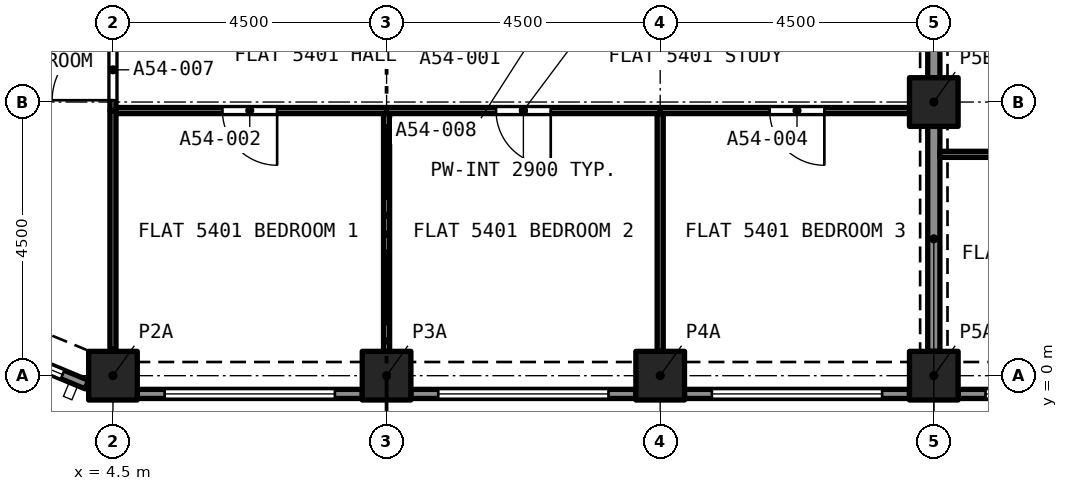
"""IFC4 building model, lengths in metres.
Left out: names, types, materials, properties, quantities, classifications, styles, units other than length and angle.
Written with IfcOpenShell. Run it as: python <this file> out.ifc"""

import sys

from ifc_helpers import new_model, si_unit, direction, frame, frame_2d, origin, origin_2d, place, context, subcontext, project, spatial, rectangle, extrude, element, fill, save


model = new_model("IFC4")
c1 = context("Model", 3, precision=1e-05, world=origin(), true_north=direction((0.0, 1.0)))
c2 = subcontext(c1, "Body", "Model", "MODEL_VIEW")
j1 = project(units=[si_unit("LENGTHUNIT", "METRE"), si_unit("PLANEANGLEUNIT", "RADIAN")], contexts=[c1])
p1 = place(None, origin())
s1 = spatial("IfcSite", under=j1, at=p1, CompositionType="ELEMENT")
p2 = place(p1, origin())
s2 = spatial("IfcBuilding", under=s1, at=p2, CompositionType="ELEMENT")
p3 = place(p2, frame((0.0, 0.0, 195.5)))
s3 = spatial("IfcBuildingStorey", under=s2, at=p3, CompositionType="ELEMENT", Elevation=195.5)
for number, where, z_axis, x_axis in (
    (1, (4.5, 0.0, 0.0), (0.0, 0.0, 1.0), (1.0, 0.0, 0.0)),
    (2, (9.0, 0.0, 0.0), (0.0, 0.0, 1.0), (1.0, 0.0, 0.0)),
    (3, (13.5, 0.0, 0.0), (0.0, 0.0, 1.0), (1.0, 0.0, 0.0)),
    (4, (18.0, 0.0, 0.0), (0.0, 0.0, 1.0), (1.0, 0.0, 0.0)),
    (5, (18.0, 4.5, 0.0), (0.0, 0.0, 1.0), (1.0, 0.0, 0.0)),
):
    element("IfcColumn", number, at=place(p3, frame(where, z_axis=z_axis, x_axis=x_axis)), inside=s3, PredefinedType="COLUMN", context=c2, shape_type="SweptSolid", body=[
        extrude(rectangle(XDim=0.8, YDim=0.8, at=origin_2d()), origin(), (0.0, 0.0, 1.0), 3.2),
    ])
p4 = place(p3, frame((4.071, -0.147, 0.0), z_axis=(0.0, 0.0, 1.0), x_axis=(-0.923885342263, 0.382669406082, 0.0)))
e6 = element("IfcWall", 6, at=p4, inside=s3, PredefinedType="SOLIDWALL", context=c2, shape_type="SweptSolid", body=[
    extrude(rectangle(XDim=2.602, YDim=0.15, at=frame_2d((1.301, 0.0))), origin(), (0.0, 0.0, 1.0), 3.2),
])
p5 = place(p4, frame((0.432, 0.0, 0.45)))
e7 = element("IfcOpeningElement", 7, at=p5, cuts=e6, PredefinedType="OPENING", context=c2, shape_type="SweptSolid", body=[
    extrude(rectangle(XDim=1.9, YDim=1.95, at=frame_2d((0.95, 0.975))), frame((0.0, 0.085, 0.0), z_axis=(0.0, -1.0, 0.0), x_axis=(1.0, 0.0, 0.0)), (0.0, 0.0, 1.0), 0.17),
])
p6 = place(p3, frame((8.6, -0.3, 0.0), z_axis=(0.0, 0.0, 1.0), x_axis=(-1.0, 0.0, 0.0)))
e8 = element("IfcWall", 8, at=p6, inside=s3, PredefinedType="SOLIDWALL", context=c2, shape_type="SweptSolid", body=[
    extrude(rectangle(XDim=3.7, YDim=0.15, at=frame_2d((1.85, 0.0))), origin(), (0.0, 0.0, 1.0), 3.2),
])
p7 = place(p6, frame((0.45, 0.0, 0.45)))
e9 = element("IfcOpeningElement", 9, at=p7, cuts=e8, PredefinedType="OPENING", context=c2, shape_type="SweptSolid", body=[
    extrude(rectangle(XDim=2.8, YDim=1.95, at=frame_2d((1.4, 0.975))), frame((0.0, 0.085, 0.0), z_axis=(0.0, -1.0, 0.0), x_axis=(1.0, 0.0, 0.0)), (0.0, 0.0, 1.0), 0.17),
])
p8 = place(p3, frame((13.1, -0.3, 0.0), z_axis=(0.0, 0.0, 1.0), x_axis=(-1.0, 0.0, 0.0)))
e10 = element("IfcWall", 10, at=p8, inside=s3, PredefinedType="SOLIDWALL", context=c2, shape_type="SweptSolid", body=[
    extrude(rectangle(XDim=3.7, YDim=0.15, at=frame_2d((1.85, 0.0))), origin(), (0.0, 0.0, 1.0), 3.2),
])
p9 = place(p8, frame((0.45, 0.0, 0.45)))
e11 = element("IfcOpeningElement", 11, at=p9, cuts=e10, PredefinedType="OPENING", context=c2, shape_type="SweptSolid", body=[
    extrude(rectangle(XDim=2.8, YDim=1.95, at=frame_2d((1.4, 0.975))), frame((0.0, 0.085, 0.0), z_axis=(0.0, -1.0, 0.0), x_axis=(1.0, 0.0, 0.0)), (0.0, 0.0, 1.0), 0.17),
])
p10 = place(p3, frame((17.6, -0.3, 0.0), z_axis=(0.0, 0.0, 1.0), x_axis=(-1.0, 0.0, 0.0)))
e12 = element("IfcWall", 12, at=p10, inside=s3, PredefinedType="SOLIDWALL", context=c2, shape_type="SweptSolid", body=[
    extrude(rectangle(XDim=3.7, YDim=0.15, at=frame_2d((1.85, 0.0))), origin(), (0.0, 0.0, 1.0), 3.2),
])
p11 = place(p10, frame((0.45, 0.0, 0.45)))
e13 = element("IfcOpeningElement", 13, at=p11, cuts=e12, PredefinedType="OPENING", context=c2, shape_type="SweptSolid", body=[
    extrude(rectangle(XDim=2.8, YDim=1.95, at=frame_2d((1.4, 0.975))), frame((0.0, 0.085, 0.0), z_axis=(0.0, -1.0, 0.0), x_axis=(1.0, 0.0, 0.0)), (0.0, 0.0, 1.0), 0.17),
])
p12 = place(p3, frame((22.1, -0.3, 0.0), z_axis=(0.0, 0.0, 1.0), x_axis=(-1.0, 0.0, 0.0)))
e14 = element("IfcWall", 14, at=p12, inside=s3, PredefinedType="SOLIDWALL", context=c2, shape_type="SweptSolid", body=[
    extrude(rectangle(XDim=3.7, YDim=0.15, at=frame_2d((1.85, 0.0))), origin(), (0.0, 0.0, 1.0), 3.2),
])
p13 = place(p12, frame((0.45, 0.0, 0.45)))
e15 = element("IfcOpeningElement", 15, at=p13, cuts=e14, PredefinedType="OPENING", context=c2, shape_type="SweptSolid", body=[
    extrude(rectangle(XDim=2.8, YDim=1.95, at=frame_2d((1.4, 0.975))), frame((0.0, 0.085, 0.0), z_axis=(0.0, -1.0, 0.0), x_axis=(1.0, 0.0, 0.0)), (0.0, 0.0, 1.0), 0.17),
])
p14 = place(p3, frame((9.0, 0.4, 0.0), z_axis=(0.0, 0.0, 1.0), x_axis=(0.0, 1.0, 0.0)))
e16 = element("IfcWall", 16, at=p14, inside=s3, PredefinedType="PARTITIONING", context=c2, shape_type="SweptSolid", body=[
    extrude(rectangle(XDim=3.91, YDim=0.1, at=frame_2d((1.955, 0.0))), origin(), (0.0, 0.0, 1.0), 2.9),
])
p15 = place(p3, frame((9.0, 4.36, 0.0), z_axis=(0.0, 0.0, 1.0), x_axis=(-1.0, 0.0, 0.0)))
e17 = element("IfcWall", 17, at=p15, inside=s3, PredefinedType="PARTITIONING", context=c2, shape_type="SweptSolid", body=[
    extrude(rectangle(XDim=4.45, YDim=0.1, at=frame_2d((2.225, 0.0))), origin(), (0.0, 0.0, 1.0), 2.9),
])
p16 = place(p15, frame((1.8, 0.0, 0.0)))
e18 = element("IfcOpeningElement", 18, at=p16, cuts=e17, PredefinedType="OPENING", context=c2, shape_type="SweptSolid", body=[
    extrude(rectangle(XDim=0.9, YDim=2.1, at=frame_2d((0.45, 1.05))), frame((0.0, 0.06, 0.0), z_axis=(0.0, -1.0, 0.0), x_axis=(1.0, 0.0, 0.0)), (0.0, 0.0, 1.0), 0.12),
])
p17 = place(p3, frame((4.5, 0.433, 0.0), z_axis=(0.0, 0.0, 1.0), x_axis=(0.0, 1.0, 0.0)))
e19 = element("IfcWall", 19, at=p17, inside=s3, PredefinedType="PARTITIONING", context=c2, shape_type="SweptSolid", body=[
    extrude(rectangle(XDim=3.927, YDim=0.1, at=frame_2d((1.964, 0.0))), origin(), (0.0, 0.0, 1.0), 2.9),
])
p18 = place(p3, frame((13.5, 0.4, 0.0), z_axis=(0.0, 0.0, 1.0), x_axis=(0.0, 1.0, 0.0)))
e20 = element("IfcWall", 20, at=p18, inside=s3, PredefinedType="PARTITIONING", context=c2, shape_type="SweptSolid", body=[
    extrude(rectangle(XDim=3.91, YDim=0.1, at=frame_2d((1.955, 0.0))), origin(), (0.0, 0.0, 1.0), 2.9),
])
p19 = place(p3, frame((13.5, 4.36, 0.0), z_axis=(0.0, 0.0, 1.0), x_axis=(-1.0, 0.0, 0.0)))
e21 = element("IfcWall", 21, at=p19, inside=s3, PredefinedType="PARTITIONING", context=c2, shape_type="SweptSolid", body=[
    extrude(rectangle(XDim=4.5, YDim=0.1, at=frame_2d((2.25, 0.0))), origin(), (0.0, 0.0, 1.0), 2.9),
])
p20 = place(p19, frame((1.8, 0.0, 0.0)))
e22 = element("IfcOpeningElement", 22, at=p20, cuts=e21, PredefinedType="OPENING", context=c2, shape_type="SweptSolid", body=[
    extrude(rectangle(XDim=0.9, YDim=2.1, at=frame_2d((0.45, 1.05))), frame((0.0, 0.06, 0.0), z_axis=(0.0, -1.0, 0.0), x_axis=(1.0, 0.0, 0.0)), (0.0, 0.0, 1.0), 0.12),
])
p21 = place(p3, frame((17.6, 4.36, 0.0), z_axis=(0.0, 0.0, 1.0), x_axis=(-1.0, 0.0, 0.0)))
e23 = element("IfcWall", 23, at=p21, inside=s3, PredefinedType="PARTITIONING", context=c2, shape_type="SweptSolid", body=[
    extrude(rectangle(XDim=4.1, YDim=0.1, at=frame_2d((2.05, 0.0))), origin(), (0.0, 0.0, 1.0), 2.9),
])
p22 = place(p21, frame((1.4, 0.0, 0.0)))
e24 = element("IfcOpeningElement", 24, at=p22, cuts=e23, PredefinedType="OPENING", context=c2, shape_type="SweptSolid", body=[
    extrude(rectangle(XDim=0.9, YDim=2.1, at=frame_2d((0.45, 1.05))), frame((0.0, 0.06, 0.0), z_axis=(0.0, -1.0, 0.0), x_axis=(1.0, 0.0, 0.0)), (0.0, 0.0, 1.0), 0.12),
])
p23 = place(p3, frame((18.0, 0.4, 0.0), z_axis=(0.0, 0.0, 1.0), x_axis=(0.0, 1.0, 0.0)))
e25 = element("IfcWall", 25, at=p23, inside=s3, PredefinedType="PARTITIONING", context=c2, shape_type="SweptSolid", body=[
    extrude(rectangle(XDim=3.7, YDim=0.2, at=frame_2d((1.85, 0.0))), origin(), (0.0, 0.0, 1.0), 2.38),
])
p24 = place(p3, frame((4.5, 4.36, 0.0), z_axis=(0.0, 0.0, 1.0), x_axis=(0.0, 1.0, 0.0)))
e26 = element("IfcWall", 26, at=p24, inside=s3, PredefinedType="PARTITIONING", context=c2, shape_type="SweptSolid", body=[
    extrude(rectangle(XDim=1.34, YDim=0.1, at=frame_2d((0.67, 0.0))), origin(), (0.0, 0.0, 1.0), 2.9),
])
p25 = place(p24, frame((0.17, 0.0, 0.0)))
e27 = element("IfcOpeningElement", 27, at=p25, cuts=e26, PredefinedType="OPENING", context=c2, shape_type="SweptSolid", body=[
    extrude(rectangle(XDim=1.0, YDim=2.1, at=frame_2d((0.5, 1.05))), frame((0.0, 0.06, 0.0), z_axis=(0.0, -1.0, 0.0), x_axis=(1.0, 0.0, 0.0)), (0.0, 0.0, 1.0), 0.12),
])
p26 = place(p3, frame((18.0, 4.9, 0.0), z_axis=(0.0, 0.0, 1.0), x_axis=(0.0, 1.0, 0.0)))
e28 = element("IfcWall", 28, at=p26, inside=s3, PredefinedType="PARTITIONING", context=c2, shape_type="SweptSolid", body=[
    extrude(rectangle(XDim=3.7, YDim=0.2, at=frame_2d((1.85, 0.0))), origin(), (0.0, 0.0, 1.0), 2.38),
])
p27 = place(p3, frame((22.5, 3.64, 0.0), z_axis=(0.0, 0.0, 1.0), x_axis=(-1.0, 0.0, 0.0)))
e29 = element("IfcWall", 29, at=p27, inside=s3, PredefinedType="PARTITIONING", context=c2, shape_type="SweptSolid", body=[
    extrude(rectangle(XDim=4.4, YDim=0.1, at=frame_2d((2.2, 0.0))), origin(), (0.0, 0.0, 1.0), 2.75),
])
p28 = place(p27, frame((1.8, 0.0, 0.0)))
e30 = element("IfcOpeningElement", 30, at=p28, cuts=e29, PredefinedType="OPENING", context=c2, shape_type="SweptSolid", body=[
    extrude(rectangle(XDim=0.9, YDim=2.1, at=frame_2d((0.45, 1.05))), frame((0.0, 0.06, 0.0), z_axis=(0.0, -1.0, 0.0), x_axis=(1.0, 0.0, 0.0)), (0.0, 0.0, 1.0), 0.12),
])
p29 = place(p5, origin())
e31 = element("IfcWindow", 31, at=p29, inside=s3, PartitioningType="SINGLE_PANEL", PredefinedType="WINDOW", context=c2, shape_type="SweptSolid", body=[
    extrude(rectangle(XDim=1.9, YDim=1.95, at=frame_2d((0.95, 0.975))), frame((0.0, 0.03, 0.0), z_axis=(0.0, -1.0, 0.0), x_axis=(1.0, 0.0, 0.0)), (0.0, 0.0, 1.0), 0.06),
])
fill(e7, e31)
p30 = place(p7, origin())
e32 = element("IfcWindow", 32, at=p30, inside=s3, PartitioningType="SINGLE_PANEL", PredefinedType="WINDOW", context=c2, shape_type="SweptSolid", body=[
    extrude(rectangle(XDim=2.8, YDim=1.95, at=frame_2d((1.4, 0.975))), frame((0.0, 0.03, 0.0), z_axis=(0.0, -1.0, 0.0), x_axis=(1.0, 0.0, 0.0)), (0.0, 0.0, 1.0), 0.06),
])
fill(e9, e32)
p31 = place(p9, origin())
e33 = element("IfcWindow", 33, at=p31, inside=s3, PartitioningType="SINGLE_PANEL", PredefinedType="WINDOW", context=c2, shape_type="SweptSolid", body=[
    extrude(rectangle(XDim=2.8, YDim=1.95, at=frame_2d((1.4, 0.975))), frame((0.0, 0.03, 0.0), z_axis=(0.0, -1.0, 0.0), x_axis=(1.0, 0.0, 0.0)), (0.0, 0.0, 1.0), 0.06),
])
fill(e11, e33)
p32 = place(p11, origin())
e34 = element("IfcWindow", 34, at=p32, inside=s3, PartitioningType="SINGLE_PANEL", PredefinedType="WINDOW", context=c2, shape_type="SweptSolid", body=[
    extrude(rectangle(XDim=2.8, YDim=1.95, at=frame_2d((1.4, 0.975))), frame((0.0, 0.03, 0.0), z_axis=(0.0, -1.0, 0.0), x_axis=(1.0, 0.0, 0.0)), (0.0, 0.0, 1.0), 0.06),
])
fill(e13, e34)
p33 = place(p13, origin())
e35 = element("IfcWindow", 35, at=p33, inside=s3, PartitioningType="SINGLE_PANEL", PredefinedType="WINDOW", context=c2, shape_type="SweptSolid", body=[
    extrude(rectangle(XDim=2.8, YDim=1.95, at=frame_2d((1.4, 0.975))), frame((0.0, 0.03, 0.0), z_axis=(0.0, -1.0, 0.0), x_axis=(1.0, 0.0, 0.0)), (0.0, 0.0, 1.0), 0.06),
])
fill(e15, e35)
p34 = place(p16, origin())
e36 = element("IfcDoor", 36, at=p34, inside=s3, OperationType="SINGLE_SWING_RIGHT", PredefinedType="DOOR", context=c2, shape_type="SweptSolid", body=[
    extrude(rectangle(XDim=0.9, YDim=2.1, at=frame_2d((0.45, 1.05))), frame((0.0, 0.025, 0.0), z_axis=(0.0, -1.0, 0.0), x_axis=(1.0, 0.0, 0.0)), (0.0, 0.0, 1.0), 0.05),
])
fill(e18, e36)
p35 = place(p20, origin())
e37 = element("IfcDoor", 37, at=p35, inside=s3, OperationType="SINGLE_SWING_LEFT", PredefinedType="DOOR", context=c2, shape_type="SweptSolid", body=[
    extrude(rectangle(XDim=0.9, YDim=2.1, at=frame_2d((0.45, 1.05))), frame((0.0, 0.025, 0.0), z_axis=(0.0, -1.0, 0.0), x_axis=(1.0, 0.0, 0.0)), (0.0, 0.0, 1.0), 0.05),
])
fill(e22, e37)
p36 = place(p22, origin())
e38 = element("IfcDoor", 38, at=p36, inside=s3, OperationType="SINGLE_SWING_LEFT", PredefinedType="DOOR", context=c2, shape_type="SweptSolid", body=[
    extrude(rectangle(XDim=0.9, YDim=2.1, at=frame_2d((0.45, 1.05))), frame((0.0, 0.025, 0.0), z_axis=(0.0, -1.0, 0.0), x_axis=(1.0, 0.0, 0.0)), (0.0, 0.0, 1.0), 0.05),
])
fill(e24, e38)
p37 = place(p25, origin())
e39 = element("IfcDoor", 39, at=p37, inside=s3, OperationType="SINGLE_SWING_RIGHT", PredefinedType="DOOR", context=c2, shape_type="SweptSolid", body=[
    extrude(rectangle(XDim=1.0, YDim=2.1, at=frame_2d((0.5, 1.05))), frame((0.0, 0.025, 0.0), z_axis=(0.0, -1.0, 0.0), x_axis=(1.0, 0.0, 0.0)), (0.0, 0.0, 1.0), 0.05),
])
fill(e27, e39)
save(model, sys.argv[1])
